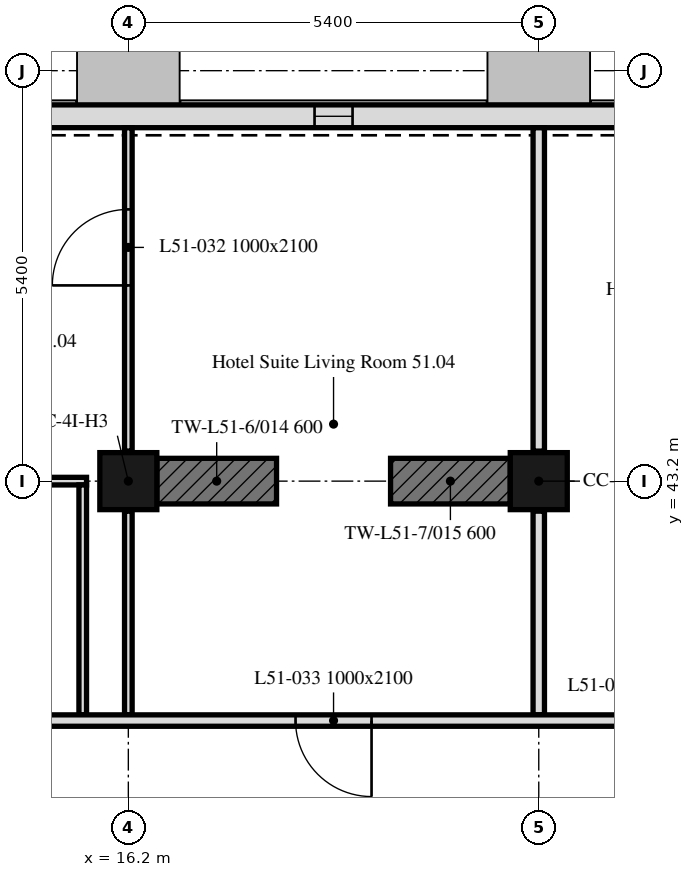
"""IFC4 building model, lengths in metres.
Left out: names, types, materials, properties, quantities, classifications, styles, units other than length and angle.
Written with IfcOpenShell. Run it as: python <this file> out.ifc"""

import sys

from ifc_helpers import new_model, si_unit, direction, frame, frame_2d, origin, origin_2d, place, context, subcontext, project, spatial, rectangle, extrude, element, fill, save


model = new_model("IFC4")
c1 = context("Model", 3, precision=1e-05, world=origin(), true_north=direction((0.0, 1.0)))
c2 = subcontext(c1, "Body", "Model", "MODEL_VIEW")
j1 = project(units=[si_unit("LENGTHUNIT", "METRE"), si_unit("PLANEANGLEUNIT", "RADIAN")], contexts=[c1])
p1 = place(None, origin())
s1 = spatial("IfcSite", under=j1, at=p1, CompositionType="ELEMENT")
p2 = place(p1, origin())
s2 = spatial("IfcBuilding", under=s1, at=p2, CompositionType="ELEMENT")
p3 = place(p2, frame((0.0, 0.0, 207.1)))
s3 = spatial("IfcBuildingStorey", under=s2, at=p3, CompositionType="ELEMENT", Elevation=207.1)
for number, where, z_axis, x_axis in (
    (1, (16.2, 43.2, 0.0), (0.0, 0.0, 1.0), (1.0, 0.0, 0.0)),
    (2, (21.6, 43.2, 0.0), (0.0, 0.0, 1.0), (1.0, 0.0, 0.0)),
):
    element("IfcColumn", number, at=place(p3, frame(where, z_axis=z_axis, x_axis=x_axis)), inside=s3, PredefinedType="COLUMN", context=c2, shape_type="SweptSolid", body=[
        extrude(rectangle(XDim=0.75, YDim=0.75, at=origin_2d()), origin(), (0.0, 0.0, 1.0), 3.0),
    ])
p4 = place(p3, frame((16.575, 43.2, 0.0), z_axis=(0.0, 0.0, 1.0), x_axis=(1.0, 0.0, 0.0)))
e3 = element("IfcWall", 3, at=p4, inside=s3, PredefinedType="SHEAR", context=c2, shape_type="SweptSolid", body=[
    extrude(rectangle(XDim=1.575, YDim=0.6, at=frame_2d((0.788, 0.0))), origin(), (0.0, 0.0, 1.0), 3.0),
])
p5 = place(p3, frame((19.65, 43.2, 0.0), z_axis=(0.0, 0.0, 1.0), x_axis=(1.0, 0.0, 0.0)))
e4 = element("IfcWall", 4, at=p5, inside=s3, PredefinedType="SHEAR", context=c2, shape_type="SweptSolid", body=[
    extrude(rectangle(XDim=1.575, YDim=0.6, at=frame_2d((0.788, 0.0))), origin(), (0.0, 0.0, 1.0), 3.0),
])
p6 = place(p3, frame((37.614, 48.0, 0.0), z_axis=(0.0, 0.0, 1.0), x_axis=(-1.0, 0.0, 0.0)))
e5 = element("IfcWall", 5, at=p6, inside=s3, PredefinedType="SOLIDWALL", context=c2, shape_type="SweptSolid", body=[
    extrude(rectangle(XDim=32.027, YDim=0.3, at=frame_2d((16.014, 0.0))), origin(), (0.0, 0.0, 1.0), 3.0),
])
p7 = place(p6, frame((0.814, 0.0, 0.9)))
e6 = element("IfcOpeningElement", 6, at=p7, cuts=e5, PredefinedType="OPENING", context=c2, shape_type="SweptSolid", body=[
    extrude(rectangle(XDim=3.4, YDim=1.7, at=frame_2d((1.7, 0.85))), frame((0.0, 0.16, 0.0), z_axis=(0.0, -1.0, 0.0), x_axis=(1.0, 0.0, 0.0)), (0.0, 0.0, 1.0), 0.32),
])
p8 = place(p6, frame((7.664, 0.0, 0.9)))
e7 = element("IfcOpeningElement", 7, at=p8, cuts=e5, PredefinedType="OPENING", context=c2, shape_type="SweptSolid", body=[
    extrude(rectangle(XDim=0.5, YDim=1.7, at=frame_2d((0.25, 0.85))), frame((0.0, 0.16, 0.0), z_axis=(0.0, -1.0, 0.0), x_axis=(1.0, 0.0, 0.0)), (0.0, 0.0, 1.0), 0.32),
])
p9 = place(p6, frame((13.064, 0.0, 0.9)))
e8 = element("IfcOpeningElement", 8, at=p9, cuts=e5, PredefinedType="OPENING", context=c2, shape_type="SweptSolid", body=[
    extrude(rectangle(XDim=0.5, YDim=1.7, at=frame_2d((0.25, 0.85))), frame((0.0, 0.16, 0.0), z_axis=(0.0, -1.0, 0.0), x_axis=(1.0, 0.0, 0.0)), (0.0, 0.0, 1.0), 0.32),
])
p10 = place(p6, frame((18.464, 0.0, 0.9)))
e9 = element("IfcOpeningElement", 9, at=p10, cuts=e5, PredefinedType="OPENING", context=c2, shape_type="SweptSolid", body=[
    extrude(rectangle(XDim=0.5, YDim=1.7, at=frame_2d((0.25, 0.85))), frame((0.0, 0.16, 0.0), z_axis=(0.0, -1.0, 0.0), x_axis=(1.0, 0.0, 0.0)), (0.0, 0.0, 1.0), 0.32),
])
p11 = place(p6, frame((23.864, 0.0, 0.9)))
e10 = element("IfcOpeningElement", 10, at=p11, cuts=e5, PredefinedType="OPENING", context=c2, shape_type="SweptSolid", body=[
    extrude(rectangle(XDim=0.5, YDim=1.7, at=frame_2d((0.25, 0.85))), frame((0.0, 0.16, 0.0), z_axis=(0.0, -1.0, 0.0), x_axis=(1.0, 0.0, 0.0)), (0.0, 0.0, 1.0), 0.32),
])
p12 = place(p6, frame((28.164, 0.0, 0.9)))
e11 = element("IfcOpeningElement", 11, at=p12, cuts=e5, PredefinedType="OPENING", context=c2, shape_type="SweptSolid", body=[
    extrude(rectangle(XDim=1.1, YDim=1.7, at=frame_2d((0.55, 0.85))), frame((0.0, 0.16, 0.0), z_axis=(0.0, -1.0, 0.0), x_axis=(1.0, 0.0, 0.0)), (0.0, 0.0, 1.0), 0.32),
])
p13 = place(p3, frame((21.6, 47.849, 0.0), z_axis=(0.0, 0.0, 1.0), x_axis=(0.0, -1.0, 0.0)))
e12 = element("IfcWall", 12, at=p13, inside=s3, PredefinedType="PARTITIONING", context=c2, shape_type="SweptSolid", body=[
    extrude(rectangle(XDim=4.254, YDim=0.15, at=frame_2d((2.127, 0.0))), origin(), (0.0, 0.0, 1.0), 2.4),
])
p14 = place(p3, frame((21.6, 42.805, 0.0), z_axis=(0.0, 0.0, 1.0), x_axis=(0.0, -1.0, 0.0)))
e13 = element("IfcWall", 13, at=p14, inside=s3, PredefinedType="PARTITIONING", context=c2, shape_type="SweptSolid", body=[
    extrude(rectangle(XDim=2.68, YDim=0.15, at=frame_2d((1.34, 0.0))), origin(), (0.0, 0.0, 1.0), 2.4),
])
p15 = place(p3, frame((16.2, 40.125, 0.0), z_axis=(0.0, 0.0, 1.0), x_axis=(0.0, 1.0, 0.0)))
e14 = element("IfcWall", 14, at=p15, inside=s3, PredefinedType="PARTITIONING", context=c2, shape_type="SweptSolid", body=[
    extrude(rectangle(XDim=2.68, YDim=0.1, at=frame_2d((1.34, 0.0))), origin(), (0.0, 0.0, 1.0), 2.4),
])
p16 = place(p3, frame((16.2, 43.595, 0.0), z_axis=(0.0, 0.0, 1.0), x_axis=(0.0, 1.0, 0.0)))
e15 = element("IfcWall", 15, at=p16, inside=s3, PredefinedType="PARTITIONING", context=c2, shape_type="SweptSolid", body=[
    extrude(rectangle(XDim=4.254, YDim=0.1, at=frame_2d((2.127, 0.0))), origin(), (0.0, 0.0, 1.0), 2.4),
])
p17 = place(p16, frame((2.18, 0.0, 0.0)))
e16 = element("IfcOpeningElement", 16, at=p17, cuts=e15, PredefinedType="OPENING", context=c2, shape_type="SweptSolid", body=[
    extrude(rectangle(XDim=1.0, YDim=2.1, at=frame_2d((0.5, 1.05))), frame((0.0, 0.05, 0.0), z_axis=(0.0, -1.0, 0.0), x_axis=(1.0, 0.0, 0.0)), (0.0, 0.0, 1.0), 0.1),
])
p18 = place(p3, frame((13.25, 43.2, 0.0), z_axis=(0.0, 0.0, 1.0), x_axis=(1.0, 0.0, 0.0)))
e17 = element("IfcWall", 17, at=p18, inside=s3, PredefinedType="PARTITIONING", context=c2, shape_type="SweptSolid", body=[
    extrude(rectangle(XDim=2.4, YDim=0.1, at=frame_2d((1.2, 0.0))), origin(), (0.0, 0.0, 1.0), 3.0),
])
p19 = place(p3, frame((15.6, 43.15, 0.0), z_axis=(0.0, 0.0, 1.0), x_axis=(0.0, -1.0, 0.0)))
e18 = element("IfcWall", 18, at=p19, inside=s3, PredefinedType="PARTITIONING", context=c2, shape_type="SweptSolid", body=[
    extrude(rectangle(XDim=3.025, YDim=0.1, at=frame_2d((1.512, 0.0))), origin(), (0.0, 0.0, 1.0), 3.0),
])
p20 = place(p3, frame((42.449, 40.05, 0.0), z_axis=(0.0, 0.0, 1.0), x_axis=(-1.0, 0.0, 0.0)))
e19 = element("IfcWall", 19, at=p20, inside=s3, PredefinedType="PARTITIONING", context=c2, shape_type="SweptSolid", body=[
    extrude(rectangle(XDim=41.698, YDim=0.15, at=frame_2d((20.849, 0.0))), origin(), (0.0, 0.0, 1.0), 2.4),
])
p21 = place(p20, frame((2.249, 0.0, 0.0)))
e20 = element("IfcOpeningElement", 20, at=p21, cuts=e19, PredefinedType="OPENING", context=c2, shape_type="SweptSolid", body=[
    extrude(rectangle(XDim=1.0, YDim=2.1, at=frame_2d((0.5, 1.05))), frame((0.0, 0.075, 0.0), z_axis=(0.0, -1.0, 0.0), x_axis=(1.0, 0.0, 0.0)), (0.0, 0.0, 1.0), 0.15),
])
p22 = place(p20, frame((6.849, 0.0, 0.0)))
e21 = element("IfcOpeningElement", 21, at=p22, cuts=e19, PredefinedType="OPENING", context=c2, shape_type="SweptSolid", body=[
    extrude(rectangle(XDim=1.0, YDim=2.1, at=frame_2d((0.5, 1.05))), frame((0.0, 0.075, 0.0), z_axis=(0.0, -1.0, 0.0), x_axis=(1.0, 0.0, 0.0)), (0.0, 0.0, 1.0), 0.15),
])
p23 = place(p20, frame((18.449, 0.0, 0.0)))
e22 = element("IfcOpeningElement", 22, at=p23, cuts=e19, PredefinedType="OPENING", context=c2, shape_type="SweptSolid", body=[
    extrude(rectangle(XDim=1.0, YDim=2.1, at=frame_2d((0.5, 1.05))), frame((0.0, 0.075, 0.0), z_axis=(0.0, -1.0, 0.0), x_axis=(1.0, 0.0, 0.0)), (0.0, 0.0, 1.0), 0.15),
])
p24 = place(p20, frame((23.049, 0.0, 0.0)))
e23 = element("IfcOpeningElement", 23, at=p24, cuts=e19, PredefinedType="OPENING", context=c2, shape_type="SweptSolid", body=[
    extrude(rectangle(XDim=1.0, YDim=2.1, at=frame_2d((0.5, 1.05))), frame((0.0, 0.075, 0.0), z_axis=(0.0, -1.0, 0.0), x_axis=(1.0, 0.0, 0.0)), (0.0, 0.0, 1.0), 0.15),
])
p25 = place(p20, frame((37.954, 0.0, 0.0)))
e24 = element("IfcOpeningElement", 24, at=p25, cuts=e19, PredefinedType="OPENING", context=c2, shape_type="SweptSolid", body=[
    extrude(rectangle(XDim=1.0, YDim=2.1, at=frame_2d((0.5, 1.05))), frame((0.0, 0.075, 0.0), z_axis=(0.0, -1.0, 0.0), x_axis=(1.0, 0.0, 0.0)), (0.0, 0.0, 1.0), 0.15),
])
p26 = place(p10, origin())
e25 = element("IfcWindow", 25, at=p26, inside=s3, PartitioningType="SINGLE_PANEL", PredefinedType="WINDOW", context=c2, shape_type="SweptSolid", body=[
    extrude(rectangle(XDim=0.5, YDim=1.7, at=frame_2d((0.25, 0.85))), frame((0.0, 0.03, 0.0), z_axis=(0.0, -1.0, 0.0), x_axis=(1.0, 0.0, 0.0)), (0.0, 0.0, 1.0), 0.06),
])
fill(e9, e25)
p27 = place(p17, origin())
e26 = element("IfcDoor", 26, at=p27, inside=s3, OperationType="SINGLE_SWING_LEFT", PredefinedType="DOOR", context=c2, shape_type="SweptSolid", body=[
    extrude(rectangle(XDim=1.0, YDim=2.1, at=frame_2d((0.5, 1.05))), frame((0.0, 0.025, 0.0), z_axis=(0.0, -1.0, 0.0), x_axis=(1.0, 0.0, 0.0)), (0.0, 0.0, 1.0), 0.05),
])
fill(e16, e26)
p28 = place(p24, origin())
e27 = element("IfcDoor", 27, at=p28, inside=s3, OperationType="SINGLE_SWING_LEFT", PredefinedType="DOOR", context=c2, shape_type="SweptSolid", body=[
    extrude(rectangle(XDim=1.0, YDim=2.1, at=frame_2d((0.5, 1.05))), frame((0.0, 0.025, 0.0), z_axis=(0.0, -1.0, 0.0), x_axis=(1.0, 0.0, 0.0)), (0.0, 0.0, 1.0), 0.05),
])
fill(e23, e27)
save(model, sys.argv[1])
